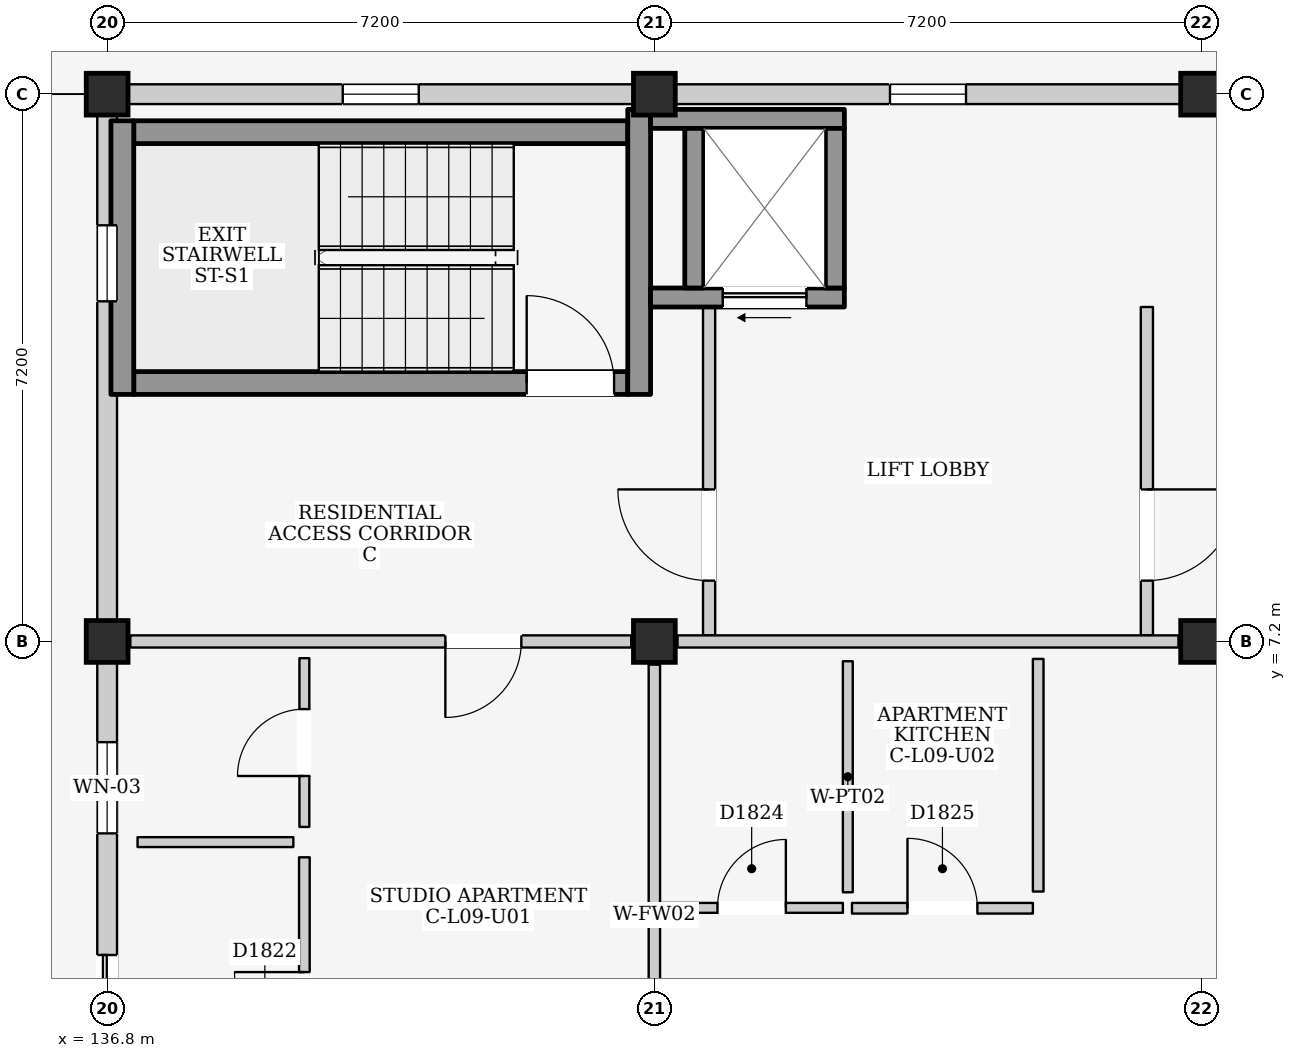
"""IFC4 building model, lengths in metres.
Left out: names, types, materials, properties, quantities, classifications, styles, units other than length and angle.
Written with IfcOpenShell. Run it as: python <this file> out.ifc"""

import sys

from ifc_helpers import new_model, si_unit, direction, frame, frame_2d, origin, origin_2d, place, context, subcontext, project, spatial, rectangle, extrude, element, fill, save


model = new_model("IFC4")
c1 = context("Model", 3, precision=1e-05, world=origin(), true_north=direction((0.0, 1.0)))
c2 = subcontext(c1, "Body", "Model", "MODEL_VIEW")
j1 = project(units=[si_unit("LENGTHUNIT", "METRE"), si_unit("PLANEANGLEUNIT", "RADIAN")], contexts=[c1])
p1 = place(None, origin())
s1 = spatial("IfcSite", under=j1, at=p1, CompositionType="ELEMENT")
p2 = place(p1, origin())
s2 = spatial("IfcBuilding", under=s1, at=p2, CompositionType="ELEMENT")
p3 = place(p2, frame((0.0, 0.0, 31.5)))
s3 = spatial("IfcBuildingStorey", under=s2, at=p3, CompositionType="ELEMENT", Elevation=31.5)
for number, where, z_axis, x_axis in (
    (1, (136.8, 7.2, 0.0), (0.0, 0.0, 1.0), (1.0, 0.0, 0.0)),
    (2, (136.8, 14.4, 0.0), (0.0, 0.0, 1.0), (1.0, 0.0, 0.0)),
    (3, (144.0, 7.2, 0.0), (0.0, 0.0, 1.0), (1.0, 0.0, 0.0)),
    (4, (144.0, 14.4, 0.0), (0.0, 0.0, 1.0), (1.0, 0.0, 0.0)),
    (5, (151.2, 7.2, 0.0), (0.0, 0.0, 1.0), (1.0, 0.0, 0.0)),
    (6, (151.2, 14.4, 0.0), (0.0, 0.0, 1.0), (1.0, 0.0, 0.0)),
):
    element("IfcColumn", number, at=place(p3, frame(where, z_axis=z_axis, x_axis=x_axis)), inside=s3, PredefinedType="COLUMN", context=c2, shape_type="SweptSolid", body=[
        extrude(rectangle(XDim=0.55, YDim=0.55, at=origin_2d()), origin(), (0.0, 0.0, 1.0), 3.3),
    ])
p4 = place(p3, frame((136.8, 0.275, 0.0), z_axis=(0.0, 0.0, 1.0), x_axis=(0.0, 1.0, 0.0)))
e7 = element("IfcWall", 7, at=p4, inside=s3, PredefinedType="ELEMENTEDWALL", context=c2, shape_type="SweptSolid", body=[
    extrude(rectangle(XDim=6.65, YDim=0.26, at=frame_2d((3.325, 0.0))), origin(), (0.0, 0.0, 1.0), 2.565),
])
p5 = place(p4, frame((1.4, 0.0, 0.0)))
e8 = element("IfcOpeningElement", 8, at=p5, cuts=e7, PredefinedType="OPENING", context=c2, shape_type="SweptSolid", body=[
    extrude(rectangle(XDim=1.4, YDim=2.1, at=frame_2d((0.7, 1.05))), frame((0.0, 0.145, 0.0), z_axis=(0.0, -1.0, 0.0), x_axis=(1.0, 0.0, 0.0)), (0.0, 0.0, 1.0), 0.29),
])
p6 = place(p4, frame((4.4, 0.0, 0.95)))
e9 = element("IfcOpeningElement", 9, at=p6, cuts=e7, PredefinedType="OPENING", context=c2, shape_type="SweptSolid", body=[
    extrude(rectangle(XDim=1.2, YDim=1.35, at=frame_2d((0.6, 0.675))), frame((0.0, 0.145, 0.0), z_axis=(0.0, -1.0, 0.0), x_axis=(1.0, 0.0, 0.0)), (0.0, 0.0, 1.0), 0.29),
])
p7 = place(p3, frame((137.075, 14.4, 0.0), z_axis=(0.0, 0.0, 1.0), x_axis=(1.0, 0.0, 0.0)))
e10 = element("IfcWall", 10, at=p7, inside=s3, PredefinedType="ELEMENTEDWALL", context=c2, shape_type="SweptSolid", body=[
    extrude(rectangle(XDim=6.65, YDim=0.26, at=frame_2d((3.325, 0.0))), origin(), (0.0, 0.0, 1.0), 2.465),
])
p8 = place(p7, frame((2.825, 0.0, 1.2)))
e11 = element("IfcOpeningElement", 11, at=p8, cuts=e10, PredefinedType="OPENING", context=c2, shape_type="SweptSolid", body=[
    extrude(rectangle(XDim=1.0, YDim=0.9, at=frame_2d((0.5, 0.45))), frame((0.0, 0.145, 0.0), z_axis=(0.0, -1.0, 0.0), x_axis=(1.0, 0.0, 0.0)), (0.0, 0.0, 1.0), 0.29),
])
p9 = place(p3, frame((136.8, 7.475, 0.0), z_axis=(0.0, 0.0, 1.0), x_axis=(0.0, 1.0, 0.0)))
e12 = element("IfcWall", 12, at=p9, inside=s3, PredefinedType="ELEMENTEDWALL", context=c2, shape_type="SweptSolid", body=[
    extrude(rectangle(XDim=6.65, YDim=0.26, at=frame_2d((3.325, 0.0))), origin(), (0.0, 0.0, 1.0), 2.565),
])
p10 = place(p9, frame((4.2, 0.0, 1.2)))
e13 = element("IfcOpeningElement", 13, at=p10, cuts=e12, PredefinedType="OPENING", context=c2, shape_type="SweptSolid", body=[
    extrude(rectangle(XDim=1.0, YDim=0.9, at=frame_2d((0.5, 0.45))), frame((0.0, 0.145, 0.0), z_axis=(0.0, -1.0, 0.0), x_axis=(1.0, 0.0, 0.0)), (0.0, 0.0, 1.0), 0.29),
])
p11 = place(p3, frame((144.275, 14.4, 0.0), z_axis=(0.0, 0.0, 1.0), x_axis=(1.0, 0.0, 0.0)))
e14 = element("IfcWall", 14, at=p11, inside=s3, PredefinedType="ELEMENTEDWALL", context=c2, shape_type="SweptSolid", body=[
    extrude(rectangle(XDim=6.65, YDim=0.26, at=frame_2d((3.325, 0.0))), origin(), (0.0, 0.0, 1.0), 2.465),
])
p12 = place(p11, frame((2.825, 0.0, 1.2)))
e15 = element("IfcOpeningElement", 15, at=p12, cuts=e14, PredefinedType="OPENING", context=c2, shape_type="SweptSolid", body=[
    extrude(rectangle(XDim=1.0, YDim=0.9, at=frame_2d((0.5, 0.45))), frame((0.0, 0.145, 0.0), z_axis=(0.0, -1.0, 0.0), x_axis=(1.0, 0.0, 0.0)), (0.0, 0.0, 1.0), 0.29),
])
p13 = place(p3, frame((137.15, 10.6, 0.0), z_axis=(0.0, 0.0, 1.0), x_axis=(1.0, 0.0, 0.0)))
e16 = element("IfcWall", 16, at=p13, inside=s3, PredefinedType="SHEAR", context=c2, shape_type="SweptSolid", body=[
    extrude(rectangle(XDim=6.5, YDim=0.3, at=frame_2d((3.25, 0.0))), origin(), (0.0, 0.0, 1.0), 3.08),
])
p14 = place(p13, frame((5.17, 0.0, 0.0)))
e17 = element("IfcOpeningElement", 17, at=p14, cuts=e16, PredefinedType="OPENING", context=c2, shape_type="SweptSolid", body=[
    extrude(rectangle(XDim=1.15, YDim=2.2, at=frame_2d((0.575, 1.1))), frame((0.0, 0.165, 0.0), z_axis=(0.0, -1.0, 0.0), x_axis=(1.0, 0.0, 0.0)), (0.0, 0.0, 1.0), 0.33),
])
p15 = place(p3, frame((137.15, 13.9, 0.0), z_axis=(0.0, 0.0, 1.0), x_axis=(1.0, 0.0, 0.0)))
e18 = element("IfcWall", 18, at=p15, inside=s3, PredefinedType="SHEAR", context=c2, shape_type="SweptSolid", body=[
    extrude(rectangle(XDim=6.5, YDim=0.3, at=frame_2d((3.25, 0.0))), origin(), (0.0, 0.0, 1.0), 3.08),
])
p16 = place(p3, frame((137.0, 10.45, 0.0), z_axis=(0.0, 0.0, 1.0), x_axis=(0.0, 1.0, 0.0)))
e19 = element("IfcWall", 19, at=p16, inside=s3, PredefinedType="SHEAR", context=c2, shape_type="SweptSolid", body=[
    extrude(rectangle(XDim=3.6, YDim=0.3, at=frame_2d((1.8, 0.0))), origin(), (0.0, 0.0, 1.0), 3.08),
])
p17 = place(p3, frame((143.8, 10.45, 0.0), z_axis=(0.0, 0.0, 1.0), x_axis=(0.0, 1.0, 0.0)))
e20 = element("IfcWall", 20, at=p17, inside=s3, PredefinedType="SHEAR", context=c2, shape_type="SweptSolid", body=[
    extrude(rectangle(XDim=3.75, YDim=0.3, at=frame_2d((1.875, 0.0))), origin(), (0.0, 0.0, 1.0), 3.08),
])
p18 = place(p3, frame((144.72, 7.28, 0.0), z_axis=(0.0, 0.0, 1.0), x_axis=(0.0, 1.0, 0.0)))
e21 = element("IfcWall", 21, at=p18, inside=s3, PredefinedType="PARTITIONING", context=c2, shape_type="SweptSolid", body=[
    extrude(rectangle(XDim=4.32, YDim=0.16, at=frame_2d((2.16, 0.0))), origin(), (0.0, 0.0, 1.0), 3.08),
])
p19 = place(p18, frame((0.72, 0.0, 0.0)))
e22 = element("IfcOpeningElement", 22, at=p19, cuts=e21, PredefinedType="OPENING", context=c2, shape_type="SweptSolid", body=[
    extrude(rectangle(XDim=1.2, YDim=2.2, at=frame_2d((0.6, 1.1))), frame((0.0, 0.095, 0.0), z_axis=(0.0, -1.0, 0.0), x_axis=(1.0, 0.0, 0.0)), (0.0, 0.0, 1.0), 0.19),
])
p20 = place(p3, frame((150.48, 7.28, 0.0), z_axis=(0.0, 0.0, 1.0), x_axis=(0.0, 1.0, 0.0)))
e23 = element("IfcWall", 23, at=p20, inside=s3, PredefinedType="PARTITIONING", context=c2, shape_type="SweptSolid", body=[
    extrude(rectangle(XDim=4.32, YDim=0.16, at=frame_2d((2.16, 0.0))), origin(), (0.0, 0.0, 1.0), 3.08),
])
p21 = place(p20, frame((0.72, 0.0, 0.0)))
e24 = element("IfcOpeningElement", 24, at=p21, cuts=e23, PredefinedType="OPENING", context=c2, shape_type="SweptSolid", body=[
    extrude(rectangle(XDim=1.2, YDim=2.2, at=frame_2d((0.6, 1.1))), frame((0.0, 0.095, 0.0), z_axis=(0.0, -1.0, 0.0), x_axis=(1.0, 0.0, 0.0)), (0.0, 0.0, 1.0), 0.19),
])
p22 = place(p3, frame((143.95, 11.725, 0.0), z_axis=(0.0, 0.0, 1.0), x_axis=(1.0, 0.0, 0.0)))
e25 = element("IfcWall", 25, at=p22, inside=s3, PredefinedType="SHEAR", context=c2, shape_type="SweptSolid", body=[
    extrude(rectangle(XDim=2.55, YDim=0.25, at=frame_2d((1.275, 0.0))), origin(), (0.0, 0.0, 1.0), 3.08),
])
p23 = place(p22, frame((0.95, 0.0, 0.0)))
e26 = element("IfcOpeningElement", 26, at=p23, cuts=e25, PredefinedType="OPENING", context=c2, shape_type="SweptSolid", body=[
    extrude(rectangle(XDim=1.1, YDim=2.15, at=frame_2d((0.55, 1.075))), frame((0.0, 0.14, 0.0), z_axis=(0.0, -1.0, 0.0), x_axis=(1.0, 0.0, 0.0)), (0.0, 0.0, 1.0), 0.28),
])
p24 = place(p3, frame((143.95, 14.075, 0.0), z_axis=(0.0, 0.0, 1.0), x_axis=(1.0, 0.0, 0.0)))
e27 = element("IfcWall", 27, at=p24, inside=s3, PredefinedType="SHEAR", context=c2, shape_type="SweptSolid", body=[
    extrude(rectangle(XDim=2.55, YDim=0.25, at=frame_2d((1.275, 0.0))), origin(), (0.0, 0.0, 1.0), 3.08),
])
for number, where, z_axis, x_axis in (
    (28, (144.525, 11.85, 0.0), (0.0, 0.0, 1.0), (0.0, 1.0, 0.0)),
    (29, (146.375, 11.85, 0.0), (0.0, 0.0, 1.0), (0.0, 1.0, 0.0)),
):
    element("IfcWall", number, at=place(p3, frame(where, z_axis=z_axis, x_axis=x_axis)), inside=s3, PredefinedType="SHEAR", context=c2, shape_type="SweptSolid", body=[
        extrude(rectangle(XDim=2.1, YDim=0.25, at=frame_2d((1.05, 0.0))), origin(), (0.0, 0.0, 1.0), 3.08),
    ])
p25 = place(p3, frame((137.105, 7.2, 0.0), z_axis=(0.0, 0.0, 1.0), x_axis=(1.0, 0.0, 0.0)))
e30 = element("IfcWall", 30, at=p25, inside=s3, PredefinedType="PARTITIONING", context=c2, shape_type="SweptSolid", body=[
    extrude(rectangle(XDim=6.59, YDim=0.16, at=frame_2d((3.295, 0.0))), origin(), (0.0, 0.0, 1.0), 2.465),
])
p26 = place(p25, frame((4.145, 0.0, 0.0)))
e31 = element("IfcOpeningElement", 31, at=p26, cuts=e30, PredefinedType="OPENING", context=c2, shape_type="SweptSolid", body=[
    extrude(rectangle(XDim=1.0, YDim=2.15, at=frame_2d((0.5, 1.075))), frame((0.0, 0.095, 0.0), z_axis=(0.0, -1.0, 0.0), x_axis=(1.0, 0.0, 0.0)), (0.0, 0.0, 1.0), 0.19),
])
p27 = place(p3, frame((144.0, 0.305, 0.0), z_axis=(0.0, 0.0, 1.0), x_axis=(0.0, 1.0, 0.0)))
e32 = element("IfcWall", 32, at=p27, inside=s3, PredefinedType="PARTITIONING", context=c2, shape_type="SweptSolid", body=[
    extrude(rectangle(XDim=6.59, YDim=0.15, at=frame_2d((3.295, 0.0))), origin(), (0.0, 0.0, 1.0), 2.565),
])
p28 = place(p3, frame((137.2, 4.56, 0.0), z_axis=(0.0, 0.0, 1.0), x_axis=(1.0, 0.0, 0.0)))
e33 = element("IfcWall", 33, at=p28, inside=s3, PredefinedType="PARTITIONING", context=c2, shape_type="SweptSolid", body=[
    extrude(rectangle(XDim=2.05, YDim=0.13, at=frame_2d((1.025, 0.0))), origin(), (0.0, 0.0, 1.0), 3.08),
])
p29 = place(p3, frame((139.395, 4.76, 0.0), z_axis=(0.0, 0.0, 1.0), x_axis=(0.0, 1.0, 0.0)))
e34 = element("IfcWall", 34, at=p29, inside=s3, PredefinedType="PARTITIONING", context=c2, shape_type="SweptSolid", body=[
    extrude(rectangle(XDim=2.22, YDim=0.13, at=frame_2d((1.11, 0.0))), origin(), (0.0, 0.0, 1.0), 3.08),
])
p30 = place(p29, frame((0.67, 0.0, 0.0)))
e35 = element("IfcOpeningElement", 35, at=p30, cuts=e34, PredefinedType="OPENING", context=c2, shape_type="SweptSolid", body=[
    extrude(rectangle(XDim=0.88, YDim=2.1, at=frame_2d((0.44, 1.05))), frame((0.0, 0.08, 0.0), z_axis=(0.0, -1.0, 0.0), x_axis=(1.0, 0.0, 0.0)), (0.0, 0.0, 1.0), 0.16),
])
p31 = place(p3, frame((139.395, 0.42, 0.0), z_axis=(0.0, 0.0, 1.0), x_axis=(0.0, 1.0, 0.0)))
e36 = element("IfcWall", 36, at=p31, inside=s3, PredefinedType="PARTITIONING", context=c2, shape_type="SweptSolid", body=[
    extrude(rectangle(XDim=3.94, YDim=0.14, at=frame_2d((1.97, 0.0))), origin(), (0.0, 0.0, 1.0), 3.08),
])
p32 = place(p31, frame((1.51, 0.0, 0.0)))
e37 = element("IfcOpeningElement", 37, at=p32, cuts=e36, PredefinedType="OPENING", context=c2, shape_type="SweptSolid", body=[
    extrude(rectangle(XDim=0.92, YDim=2.1, at=frame_2d((0.46, 1.05))), frame((0.0, 0.085, 0.0), z_axis=(0.0, -1.0, 0.0), x_axis=(1.0, 0.0, 0.0)), (0.0, 0.0, 1.0), 0.17),
])
p33 = place(p3, frame((144.305, 7.2, 0.0), z_axis=(0.0, 0.0, 1.0), x_axis=(1.0, 0.0, 0.0)))
e38 = element("IfcWall", 38, at=p33, inside=s3, PredefinedType="PARTITIONING", context=c2, shape_type="SweptSolid", body=[
    extrude(rectangle(XDim=6.59, YDim=0.16, at=frame_2d((3.295, 0.0))), origin(), (0.0, 0.0, 1.0), 2.465),
])
p34 = place(p3, frame((144.08, 3.695, 0.0), z_axis=(0.0, 0.0, 1.0), x_axis=(1.0, 0.0, 0.0)))
e39 = element("IfcWall", 39, at=p34, inside=s3, PredefinedType="PARTITIONING", context=c2, shape_type="SweptSolid", body=[
    extrude(rectangle(XDim=2.4, YDim=0.13, at=frame_2d((1.2, 0.0))), origin(), (0.0, 0.0, 1.0), 3.08),
])
p35 = place(p34, frame((0.75, 0.0, 0.0)))
e40 = element("IfcOpeningElement", 40, at=p35, cuts=e39, PredefinedType="OPENING", context=c2, shape_type="SweptSolid", body=[
    extrude(rectangle(XDim=0.9, YDim=2.1, at=frame_2d((0.45, 1.05))), frame((0.0, 0.08, 0.0), z_axis=(0.0, -1.0, 0.0), x_axis=(1.0, 0.0, 0.0)), (0.0, 0.0, 1.0), 0.16),
])
p36 = place(p3, frame((146.545, 3.9, 0.0), z_axis=(0.0, 0.0, 1.0), x_axis=(0.0, 1.0, 0.0)))
e41 = element("IfcWall", 41, at=p36, inside=s3, PredefinedType="PARTITIONING", context=c2, shape_type="SweptSolid", body=[
    extrude(rectangle(XDim=3.04, YDim=0.13, at=frame_2d((1.52, 0.0))), origin(), (0.0, 0.0, 1.0), 3.08),
])
p37 = place(p3, frame((146.6, 3.69, 0.0), z_axis=(0.0, 0.0, 1.0), x_axis=(1.0, 0.0, 0.0)))
e42 = element("IfcWall", 42, at=p37, inside=s3, PredefinedType="PARTITIONING", context=c2, shape_type="SweptSolid", body=[
    extrude(rectangle(XDim=2.38, YDim=0.14, at=frame_2d((1.19, 0.0))), origin(), (0.0, 0.0, 1.0), 3.08),
])
p38 = place(p37, frame((0.73, 0.0, 0.0)))
e43 = element("IfcOpeningElement", 43, at=p38, cuts=e42, PredefinedType="OPENING", context=c2, shape_type="SweptSolid", body=[
    extrude(rectangle(XDim=0.92, YDim=2.1, at=frame_2d((0.46, 1.05))), frame((0.0, 0.085, 0.0), z_axis=(0.0, -1.0, 0.0), x_axis=(1.0, 0.0, 0.0)), (0.0, 0.0, 1.0), 0.17),
])
p39 = place(p3, frame((149.05, 3.91, 0.0), z_axis=(0.0, 0.0, 1.0), x_axis=(0.0, 1.0, 0.0)))
e44 = element("IfcWall", 44, at=p39, inside=s3, PredefinedType="PARTITIONING", context=c2, shape_type="SweptSolid", body=[
    extrude(rectangle(XDim=3.06, YDim=0.14, at=frame_2d((1.53, 0.0))), origin(), (0.0, 0.0, 1.0), 3.08),
])
p40 = place(p5, frame((1.4, 0.0, 0.0), z_axis=(0.0, 0.0, 1.0), x_axis=(-1.0, 0.0, 0.0)))
e45 = element("IfcDoor", 45, at=p40, inside=s3, OperationType="SLIDING_TO_RIGHT", PredefinedType="DOOR", context=c2, shape_type="SweptSolid", body=[
    extrude(rectangle(XDim=1.4, YDim=2.1, at=frame_2d((0.7, 1.05))), frame((0.0, 0.025, 0.0), z_axis=(0.0, -1.0, 0.0), x_axis=(1.0, 0.0, 0.0)), (0.0, 0.0, 1.0), 0.05),
])
fill(e8, e45)
p41 = place(p6, origin())
e46 = element("IfcWindow", 46, at=p41, inside=s3, PartitioningType="SINGLE_PANEL", PredefinedType="WINDOW", context=c2, shape_type="SweptSolid", body=[
    extrude(rectangle(XDim=1.2, YDim=1.35, at=frame_2d((0.6, 0.675))), frame((0.0, 0.03, 0.0), z_axis=(0.0, -1.0, 0.0), x_axis=(1.0, 0.0, 0.0)), (0.0, 0.0, 1.0), 0.06),
])
fill(e9, e46)
p42 = place(p8, origin())
e47 = element("IfcWindow", 47, at=p42, inside=s3, PartitioningType="SINGLE_PANEL", PredefinedType="WINDOW", context=c2, shape_type="SweptSolid", body=[
    extrude(rectangle(XDim=1.0, YDim=0.9, at=frame_2d((0.5, 0.45))), frame((0.0, 0.03, 0.0), z_axis=(0.0, -1.0, 0.0), x_axis=(1.0, 0.0, 0.0)), (0.0, 0.0, 1.0), 0.06),
])
fill(e11, e47)
p43 = place(p10, origin())
e48 = element("IfcWindow", 48, at=p43, inside=s3, PartitioningType="SINGLE_PANEL", PredefinedType="WINDOW", context=c2, shape_type="SweptSolid", body=[
    extrude(rectangle(XDim=1.0, YDim=0.9, at=frame_2d((0.5, 0.45))), frame((0.0, 0.03, 0.0), z_axis=(0.0, -1.0, 0.0), x_axis=(1.0, 0.0, 0.0)), (0.0, 0.0, 1.0), 0.06),
])
fill(e13, e48)
p44 = place(p12, origin())
e49 = element("IfcWindow", 49, at=p44, inside=s3, PartitioningType="SINGLE_PANEL", PredefinedType="WINDOW", context=c2, shape_type="SweptSolid", body=[
    extrude(rectangle(XDim=1.0, YDim=0.9, at=frame_2d((0.5, 0.45))), frame((0.0, 0.03, 0.0), z_axis=(0.0, -1.0, 0.0), x_axis=(1.0, 0.0, 0.0)), (0.0, 0.0, 1.0), 0.06),
])
fill(e15, e49)
p45 = place(p14, origin())
e50 = element("IfcDoor", 50, at=p45, inside=s3, OperationType="SINGLE_SWING_LEFT", PredefinedType="DOOR", context=c2, shape_type="SweptSolid", body=[
    extrude(rectangle(XDim=1.15, YDim=2.2, at=frame_2d((0.575, 1.1))), frame((0.0, 0.025, 0.0), z_axis=(0.0, -1.0, 0.0), x_axis=(1.0, 0.0, 0.0)), (0.0, 0.0, 1.0), 0.05),
])
fill(e17, e50)
p46 = place(p19, origin())
e51 = element("IfcDoor", 51, at=p46, inside=s3, OperationType="SINGLE_SWING_RIGHT", PredefinedType="DOOR", context=c2, shape_type="SweptSolid", body=[
    extrude(rectangle(XDim=1.2, YDim=2.2, at=frame_2d((0.6, 1.1))), frame((0.0, 0.025, 0.0), z_axis=(0.0, -1.0, 0.0), x_axis=(1.0, 0.0, 0.0)), (0.0, 0.0, 1.0), 0.05),
])
fill(e22, e51)
p47 = place(p21, frame((1.2, 0.0, 0.0), z_axis=(0.0, 0.0, 1.0), x_axis=(-1.0, 0.0, 0.0)))
e52 = element("IfcDoor", 52, at=p47, inside=s3, OperationType="SINGLE_SWING_LEFT", PredefinedType="DOOR", context=c2, shape_type="SweptSolid", body=[
    extrude(rectangle(XDim=1.2, YDim=2.2, at=frame_2d((0.6, 1.1))), frame((0.0, 0.025, 0.0), z_axis=(0.0, -1.0, 0.0), x_axis=(1.0, 0.0, 0.0)), (0.0, 0.0, 1.0), 0.05),
])
fill(e24, e52)
p48 = place(p23, frame((1.1, 0.0, 0.0), z_axis=(0.0, 0.0, 1.0), x_axis=(-1.0, 0.0, 0.0)))
e53 = element("IfcDoor", 53, at=p48, inside=s3, OperationType="SLIDING_TO_LEFT", PredefinedType="DOOR", context=c2, shape_type="SweptSolid", body=[
    extrude(rectangle(XDim=1.1, YDim=2.15, at=frame_2d((0.55, 1.075))), frame((0.0, 0.025, 0.0), z_axis=(0.0, -1.0, 0.0), x_axis=(1.0, 0.0, 0.0)), (0.0, 0.0, 1.0), 0.05),
])
fill(e26, e53)
p49 = place(p26, frame((1.0, 0.0, 0.0), z_axis=(0.0, 0.0, 1.0), x_axis=(-1.0, 0.0, 0.0)))
e54 = element("IfcDoor", 54, at=p49, inside=s3, OperationType="SINGLE_SWING_RIGHT", PredefinedType="DOOR", context=c2, shape_type="SweptSolid", body=[
    extrude(rectangle(XDim=1.0, YDim=2.15, at=frame_2d((0.5, 1.075))), frame((0.0, 0.025, 0.0), z_axis=(0.0, -1.0, 0.0), x_axis=(1.0, 0.0, 0.0)), (0.0, 0.0, 1.0), 0.05),
])
fill(e31, e54)
p50 = place(p30, origin())
e55 = element("IfcDoor", 55, at=p50, inside=s3, OperationType="SINGLE_SWING_LEFT", PredefinedType="DOOR", context=c2, shape_type="SweptSolid", body=[
    extrude(rectangle(XDim=0.88, YDim=2.1, at=frame_2d((0.44, 1.05))), frame((0.0, 0.025, 0.0), z_axis=(0.0, -1.0, 0.0), x_axis=(1.0, 0.0, 0.0)), (0.0, 0.0, 1.0), 0.05),
])
fill(e35, e55)
p51 = place(p32, origin())
e56 = element("IfcDoor", 56, at=p51, inside=s3, OperationType="SINGLE_SWING_RIGHT", PredefinedType="DOOR", context=c2, shape_type="SweptSolid", body=[
    extrude(rectangle(XDim=0.92, YDim=2.1, at=frame_2d((0.46, 1.05))), frame((0.0, 0.025, 0.0), z_axis=(0.0, -1.0, 0.0), x_axis=(1.0, 0.0, 0.0)), (0.0, 0.0, 1.0), 0.05),
])
fill(e37, e56)
p52 = place(p35, origin())
e57 = element("IfcDoor", 57, at=p52, inside=s3, OperationType="SINGLE_SWING_RIGHT", PredefinedType="DOOR", context=c2, shape_type="SweptSolid", body=[
    extrude(rectangle(XDim=0.9, YDim=2.1, at=frame_2d((0.45, 1.05))), frame((0.0, 0.025, 0.0), z_axis=(0.0, -1.0, 0.0), x_axis=(1.0, 0.0, 0.0)), (0.0, 0.0, 1.0), 0.05),
])
fill(e40, e57)
p53 = place(p38, origin())
e58 = element("IfcDoor", 58, at=p53, inside=s3, OperationType="SINGLE_SWING_LEFT", PredefinedType="DOOR", context=c2, shape_type="SweptSolid", body=[
    extrude(rectangle(XDim=0.92, YDim=2.1, at=frame_2d((0.46, 1.05))), frame((0.0, 0.025, 0.0), z_axis=(0.0, -1.0, 0.0), x_axis=(1.0, 0.0, 0.0)), (0.0, 0.0, 1.0), 0.05),
])
fill(e43, e58)
save(model, sys.argv[1])
